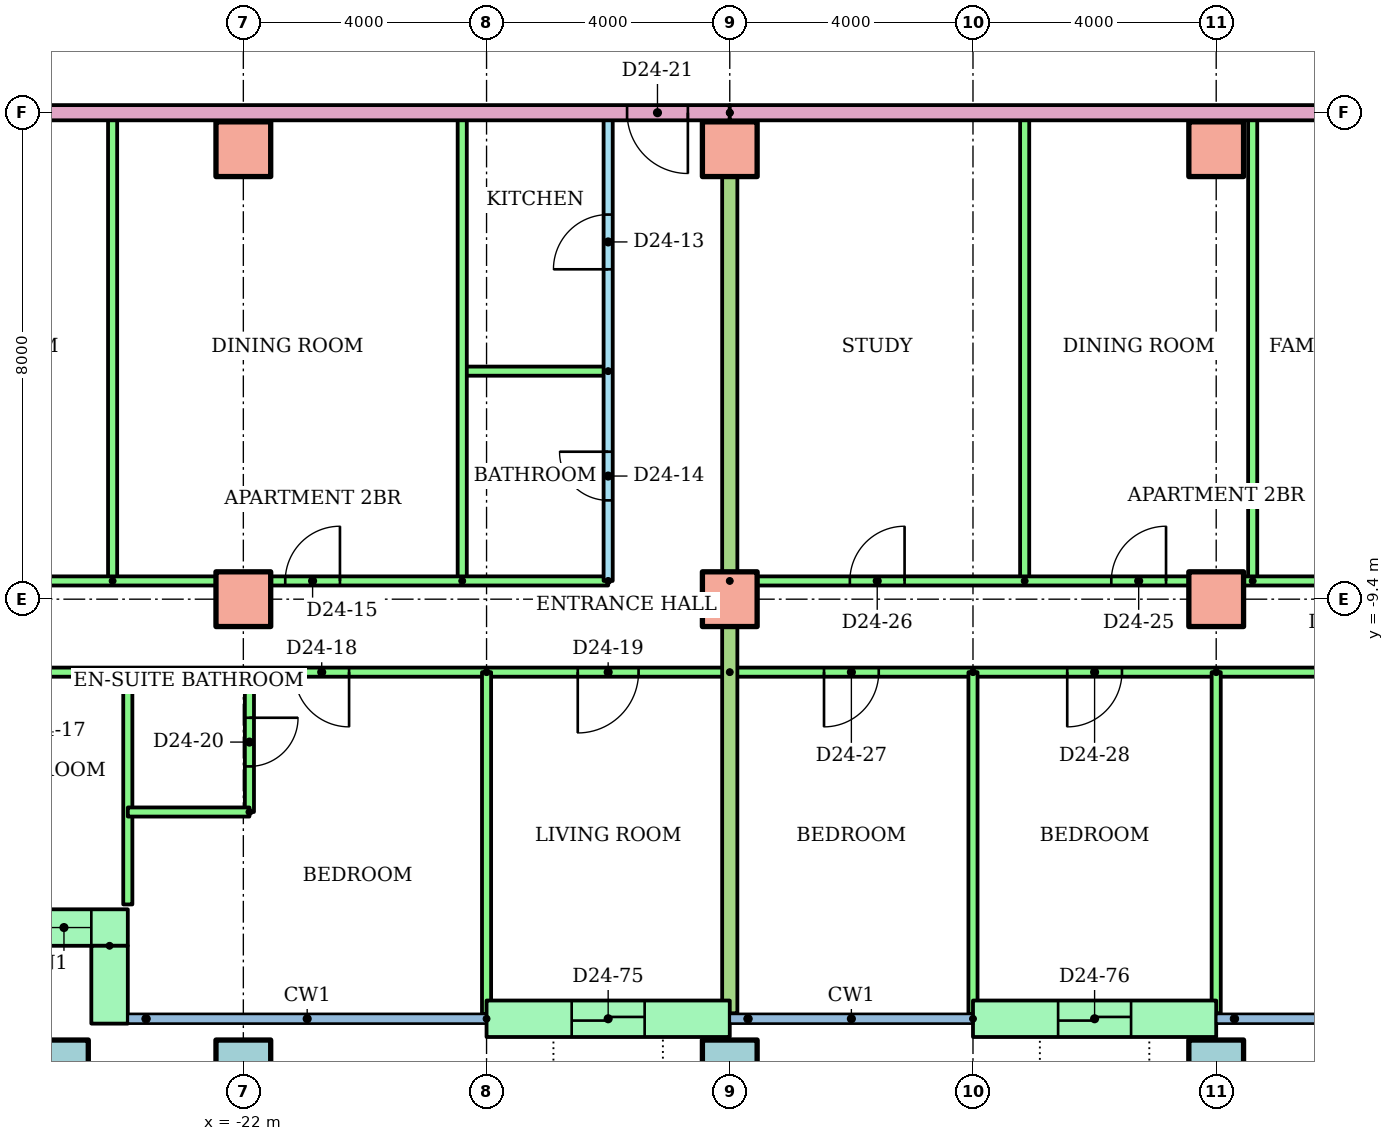
"""IFC4 building model, lengths in metres.
Left out: names, types, materials, properties, quantities, classifications, styles, units other than length and angle.
Written with IfcOpenShell. Run it as: python <this file> out.ifc"""

import sys

from ifc_helpers import new_model, si_unit, direction, frame, frame_2d, origin, origin_2d, place, context, subcontext, project, spatial, rectangle, hollow_rectangle, extrude, element, fill, save


model = new_model("IFC4")
c1 = context("Model", 3, precision=1e-05, world=origin(), true_north=direction((0.0, 1.0)))
c2 = subcontext(c1, "Body", "Model", "MODEL_VIEW")
j1 = project(units=[si_unit("LENGTHUNIT", "METRE"), si_unit("PLANEANGLEUNIT", "RADIAN")], contexts=[c1])
p1 = place(None, origin())
s1 = spatial("IfcSite", under=j1, at=p1, CompositionType="ELEMENT")
p2 = place(p1, origin())
s2 = spatial("IfcBuilding", under=s1, at=p2, CompositionType="ELEMENT")
p3 = place(p2, frame((0.0, 0.0, 93.5)))
s3 = spatial("IfcBuildingStorey", under=s2, at=p3, CompositionType="ELEMENT", Elevation=93.5)
for number, where in (
    (1, (-25.0, -17.1, 0.0)),
    (2, (-22.0, -17.1, 0.0)),
    (3, (-14.0, -17.1, 0.0)),
    (4, (-6.0, -17.1, 0.0)),
):
    element("IfcColumn", number, at=place(p3, frame(where)), inside=s3, PredefinedType="COLUMN", context=c2, shape_type="SweptSolid", body=[
        extrude(hollow_rectangle(XDim=0.9, YDim=0.9, WallThickness=0.045, at=origin_2d()), origin(), (0.0, 0.0, 1.0), 3.2),
    ])
for number, where in (
    (5, (-22.0, -9.4, 0.0)),
    (6, (-14.0, -9.4, 0.0)),
    (7, (-6.0, -9.4, 0.0)),
    (8, (-22.0, -2.0, 0.0)),
    (9, (-14.0, -2.0, 0.0)),
    (10, (-6.0, -2.0, 0.0)),
):
    element("IfcColumn", number, at=place(p3, frame(where)), inside=s3, PredefinedType="COLUMN", context=c2, shape_type="SweptSolid", body=[
        extrude(rectangle(XDim=0.9, YDim=0.9, at=origin_2d()), origin(), (0.0, 0.0, 1.0), 3.2),
    ])
p4 = place(p3, frame((-26.0, -14.8, 0.0)))
e11 = element("IfcWall", 11, at=p4, inside=s3, PredefinedType="STANDARD", context=c2, shape_type="SweptSolid", body=[
    extrude(rectangle(XDim=2.1, YDim=0.6, at=frame_2d((1.05, 0.0))), origin(), (0.0, 0.0, 1.0), 2.92),
])
p5 = place(p4, frame((0.6, 0.0, 0.9)))
e12 = element("IfcOpeningElement", 12, at=p5, cuts=e11, PredefinedType="OPENING", context=c2, shape_type="SweptSolid", body=[
    extrude(rectangle(XDim=0.9, YDim=1.5, at=frame_2d((0.45, 0.75))), frame((0.0, 0.31, 0.0), z_axis=(0.0, -1.0, 0.0), x_axis=(1.0, 0.0, 0.0)), (0.0, 0.0, 1.0), 0.62),
])
p6 = place(p3, frame((-24.2, -15.1, 0.0), z_axis=(0.0, 0.0, 1.0), x_axis=(0.0, -1.0, 0.0)))
e13 = element("IfcWall", 13, at=p6, inside=s3, PredefinedType="STANDARD", context=c2, shape_type="SweptSolid", body=[
    extrude(rectangle(XDim=1.28, YDim=0.6, at=frame_2d((0.64, 0.0))), origin(), (0.0, 0.0, 1.0), 2.92),
])
p7 = place(p3, frame((-18.0, -16.3, 0.0)))
e14 = element("IfcWall", 14, at=p7, inside=s3, PredefinedType="STANDARD", context=c2, shape_type="SweptSolid", body=[
    extrude(rectangle(XDim=4.0, YDim=0.6, at=frame_2d((2.0, 0.0))), origin(), (0.0, 0.0, 1.0), 2.92),
])
p8 = place(p7, frame((1.4, 0.0, 0.0)))
e15 = element("IfcOpeningElement", 15, at=p8, cuts=e14, PredefinedType="OPENING", context=c2, shape_type="SweptSolid", body=[
    extrude(rectangle(XDim=1.2, YDim=2.1, at=frame_2d((0.6, 1.05))), frame((0.0, 0.31, 0.0), z_axis=(0.0, -1.0, 0.0), x_axis=(1.0, 0.0, 0.0)), (0.0, 0.0, 1.0), 0.62),
])
p9 = place(p3, frame((-10.0, -16.3, 0.0)))
e16 = element("IfcWall", 16, at=p9, inside=s3, PredefinedType="STANDARD", context=c2, shape_type="SweptSolid", body=[
    extrude(rectangle(XDim=4.0, YDim=0.6, at=frame_2d((2.0, 0.0))), origin(), (0.0, 0.0, 1.0), 2.92),
])
p10 = place(p9, frame((1.4, 0.0, 0.0)))
e17 = element("IfcOpeningElement", 17, at=p10, cuts=e16, PredefinedType="OPENING", context=c2, shape_type="SweptSolid", body=[
    extrude(rectangle(XDim=1.2, YDim=2.1, at=frame_2d((0.6, 1.05))), frame((0.0, 0.31, 0.0), z_axis=(0.0, -1.0, 0.0), x_axis=(1.0, 0.0, 0.0)), (0.0, 0.0, 1.0), 0.62),
])
p11 = place(p3, frame((-16.0, -9.1, 0.0), z_axis=(0.0, 0.0, 1.0), x_axis=(0.0, 1.0, 0.0)))
e18 = element("IfcWall", 18, at=p11, inside=s3, PredefinedType="PARTITIONING", context=c2, shape_type="SweptSolid", body=[
    extrude(rectangle(XDim=7.7, YDim=0.15, at=frame_2d((3.85, 0.0))), origin(), (0.0, 0.0, 1.0), 2.4),
])
p12 = place(p11, frame((5.125, 0.0, 0.0)))
e19 = element("IfcOpeningElement", 19, at=p12, cuts=e18, PredefinedType="OPENING", context=c2, shape_type="SweptSolid", body=[
    extrude(rectangle(XDim=0.9, YDim=2.1, at=frame_2d((0.45, 1.05))), frame((0.0, 0.085, 0.0), z_axis=(0.0, -1.0, 0.0), x_axis=(1.0, 0.0, 0.0)), (0.0, 0.0, 1.0), 0.17),
])
p13 = place(p11, frame((1.325, 0.0, 0.0)))
e20 = element("IfcOpeningElement", 20, at=p13, cuts=e18, PredefinedType="OPENING", context=c2, shape_type="SweptSolid", body=[
    extrude(rectangle(XDim=0.8, YDim=2.1, at=frame_2d((0.4, 1.05))), frame((0.0, 0.085, 0.0), z_axis=(0.0, -1.0, 0.0), x_axis=(1.0, 0.0, 0.0)), (0.0, 0.0, 1.0), 0.17),
])
p14 = place(p3, frame((-16.0, -5.65, 0.0), z_axis=(0.0, 0.0, 1.0), x_axis=(-1.0, 0.0, 0.0)))
e21 = element("IfcWall", 21, at=p14, inside=s3, PredefinedType="PARTITIONING", context=c2, shape_type="SweptSolid", body=[
    extrude(rectangle(XDim=2.4, YDim=0.15, at=frame_2d((1.2, 0.0))), origin(), (0.0, 0.0, 1.0), 2.4),
])
for number, where, z_axis, x_axis in (
    (22, (-18.4, -9.1, 0.0), (0.0, 0.0, 1.0), (0.0, 1.0, 0.0)),
    (23, (-24.15, -9.1, 0.0), (0.0, 0.0, 1.0), (0.0, 1.0, 0.0)),
):
    element("IfcWall", number, at=place(p3, frame(where, z_axis=z_axis, x_axis=x_axis)), inside=s3, PredefinedType="PARTITIONING", context=c2, shape_type="SweptSolid", body=[
        extrude(rectangle(XDim=7.7, YDim=0.15, at=frame_2d((3.85, 0.0))), origin(), (0.0, 0.0, 1.0), 2.4),
    ])
p15 = place(p3, frame((-28.61, -9.1, 0.0)))
e24 = element("IfcWall", 24, at=p15, inside=s3, PredefinedType="PARTITIONING", context=c2, shape_type="SweptSolid", body=[
    extrude(rectangle(XDim=12.61, YDim=0.15, at=frame_2d((6.305, 0.0))), origin(), (0.0, 0.0, 1.0), 2.4),
])
p16 = place(p15, frame((7.299, 0.0, 0.0)))
e25 = element("IfcOpeningElement", 25, at=p16, cuts=e24, PredefinedType="OPENING", context=c2, shape_type="SweptSolid", body=[
    extrude(rectangle(XDim=0.9, YDim=2.1, at=frame_2d((0.45, 1.05))), frame((0.0, 0.085, 0.0), z_axis=(0.0, -1.0, 0.0), x_axis=(1.0, 0.0, 0.0)), (0.0, 0.0, 1.0), 0.17),
])
p17 = place(p15, frame((1.885, 0.0, 0.0)))
e26 = element("IfcOpeningElement", 26, at=p17, cuts=e24, PredefinedType="OPENING", context=c2, shape_type="SweptSolid", body=[
    extrude(rectangle(XDim=0.9, YDim=2.1, at=frame_2d((0.45, 1.05))), frame((0.0, 0.085, 0.0), z_axis=(0.0, -1.0, 0.0), x_axis=(1.0, 0.0, 0.0)), (0.0, 0.0, 1.0), 0.17),
])
p18 = place(p3, frame((-14.0, -10.6, 0.0), z_axis=(0.0, 0.0, 1.0), x_axis=(-1.0, 0.0, 0.0)))
e27 = element("IfcWall", 27, at=p18, inside=s3, PredefinedType="PARTITIONING", context=c2, shape_type="SweptSolid", body=[
    extrude(rectangle(XDim=14.62, YDim=0.15, at=frame_2d((7.31, 0.0))), origin(), (0.0, 0.0, 1.0), 2.4),
])
p19 = place(p18, frame((11.7, 0.0, 0.0)))
e28 = element("IfcOpeningElement", 28, at=p19, cuts=e27, PredefinedType="OPENING", context=c2, shape_type="SweptSolid", body=[
    extrude(rectangle(XDim=0.9, YDim=2.1, at=frame_2d((0.45, 1.05))), frame((0.0, 0.085, 0.0), z_axis=(0.0, -1.0, 0.0), x_axis=(1.0, 0.0, 0.0)), (0.0, 0.0, 1.0), 0.17),
])
p20 = place(p18, frame((6.261, 0.0, 0.0)))
e29 = element("IfcOpeningElement", 29, at=p20, cuts=e27, PredefinedType="OPENING", context=c2, shape_type="SweptSolid", body=[
    extrude(rectangle(XDim=0.9, YDim=2.1, at=frame_2d((0.45, 1.05))), frame((0.0, 0.085, 0.0), z_axis=(0.0, -1.0, 0.0), x_axis=(1.0, 0.0, 0.0)), (0.0, 0.0, 1.0), 0.17),
])
p21 = place(p18, frame((1.5, 0.0, 0.0)))
e30 = element("IfcOpeningElement", 30, at=p21, cuts=e27, PredefinedType="OPENING", context=c2, shape_type="SweptSolid", body=[
    extrude(rectangle(XDim=1.0, YDim=2.1, at=frame_2d((0.5, 1.05))), frame((0.0, 0.085, 0.0), z_axis=(0.0, -1.0, 0.0), x_axis=(1.0, 0.0, 0.0)), (0.0, 0.0, 1.0), 0.17),
])
p22 = place(p3, frame((-23.9, -10.6, 0.0), z_axis=(0.0, 0.0, 1.0), x_axis=(0.0, -1.0, 0.0)))
e31 = element("IfcWall", 31, at=p22, inside=s3, PredefinedType="PARTITIONING", context=c2, shape_type="SweptSolid", body=[
    extrude(rectangle(XDim=3.82, YDim=0.15, at=frame_2d((1.91, 0.0))), origin(), (0.0, 0.0, 1.0), 2.4),
])
p23 = place(p3, frame((-18.0, -10.6, 0.0), z_axis=(0.0, 0.0, 1.0), x_axis=(0.0, -1.0, 0.0)))
e32 = element("IfcWall", 32, at=p23, inside=s3, PredefinedType="PARTITIONING", context=c2, shape_type="SweptSolid", body=[
    extrude(rectangle(XDim=5.621, YDim=0.15, at=frame_2d((2.811, 0.0))), origin(), (0.0, 0.0, 1.0), 2.4),
])
p24 = place(p3, frame((-21.9, -10.6, 0.0), z_axis=(0.0, 0.0, 1.0), x_axis=(0.0, -1.0, 0.0)))
e33 = element("IfcWall", 33, at=p24, inside=s3, PredefinedType="PARTITIONING", context=c2, shape_type="SweptSolid", body=[
    extrude(rectangle(XDim=2.3, YDim=0.15, at=frame_2d((1.15, 0.0))), origin(), (0.0, 0.0, 1.0), 2.4),
])
p25 = place(p24, frame((0.75, 0.0, 0.0)))
e34 = element("IfcOpeningElement", 34, at=p25, cuts=e33, PredefinedType="OPENING", context=c2, shape_type="SweptSolid", body=[
    extrude(rectangle(XDim=0.8, YDim=2.1, at=frame_2d((0.4, 1.05))), frame((0.0, 0.085, 0.0), z_axis=(0.0, -1.0, 0.0), x_axis=(1.0, 0.0, 0.0)), (0.0, 0.0, 1.0), 0.17),
])
p26 = place(p3, frame((-21.9, -12.9, 0.0), z_axis=(0.0, 0.0, 1.0), x_axis=(-1.0, 0.0, 0.0)))
e35 = element("IfcWall", 35, at=p26, inside=s3, PredefinedType="PARTITIONING", context=c2, shape_type="SweptSolid", body=[
    extrude(rectangle(XDim=2.0, YDim=0.15, at=frame_2d((1.0, 0.0))), origin(), (0.0, 0.0, 1.0), 2.4),
])
for number, where, z_axis, x_axis in (
    (36, (-5.4, -9.1, 0.0), (0.0, 0.0, 1.0), (0.0, 1.0, 0.0)),
    (37, (-9.15, -9.1, 0.0), (0.0, 0.0, 1.0), (0.0, 1.0, 0.0)),
):
    element("IfcWall", number, at=place(p3, frame(where, z_axis=z_axis, x_axis=x_axis)), inside=s3, PredefinedType="PARTITIONING", context=c2, shape_type="SweptSolid", body=[
        extrude(rectangle(XDim=7.7, YDim=0.15, at=frame_2d((3.85, 0.0))), origin(), (0.0, 0.0, 1.0), 2.4),
    ])
p27 = place(p3, frame((-14.0, -9.1, 0.0)))
e38 = element("IfcWall", 38, at=p27, inside=s3, PredefinedType="PARTITIONING", context=c2, shape_type="SweptSolid", body=[
    extrude(rectangle(XDim=14.0, YDim=0.15, at=frame_2d((7.0, 0.0))), origin(), (0.0, 0.0, 1.0), 2.4),
])
p28 = place(p27, frame((9.65, 0.0, 0.0)))
e39 = element("IfcOpeningElement", 39, at=p28, cuts=e38, PredefinedType="OPENING", context=c2, shape_type="SweptSolid", body=[
    extrude(rectangle(XDim=0.9, YDim=2.1, at=frame_2d((0.45, 1.05))), frame((0.0, 0.085, 0.0), z_axis=(0.0, -1.0, 0.0), x_axis=(1.0, 0.0, 0.0)), (0.0, 0.0, 1.0), 0.17),
])
p29 = place(p27, frame((6.275, 0.0, 0.0)))
e40 = element("IfcOpeningElement", 40, at=p29, cuts=e38, PredefinedType="OPENING", context=c2, shape_type="SweptSolid", body=[
    extrude(rectangle(XDim=0.9, YDim=2.1, at=frame_2d((0.45, 1.05))), frame((0.0, 0.085, 0.0), z_axis=(0.0, -1.0, 0.0), x_axis=(1.0, 0.0, 0.0)), (0.0, 0.0, 1.0), 0.17),
])
p30 = place(p27, frame((1.975, 0.0, 0.0)))
e41 = element("IfcOpeningElement", 41, at=p30, cuts=e38, PredefinedType="OPENING", context=c2, shape_type="SweptSolid", body=[
    extrude(rectangle(XDim=0.9, YDim=2.1, at=frame_2d((0.45, 1.05))), frame((0.0, 0.085, 0.0), z_axis=(0.0, -1.0, 0.0), x_axis=(1.0, 0.0, 0.0)), (0.0, 0.0, 1.0), 0.17),
])
p31 = place(p3, frame((2.0, -10.6, 0.0), z_axis=(0.0, 0.0, 1.0), x_axis=(-1.0, 0.0, 0.0)))
e42 = element("IfcWall", 42, at=p31, inside=s3, PredefinedType="PARTITIONING", context=c2, shape_type="SweptSolid", body=[
    extrude(rectangle(XDim=16.0, YDim=0.15, at=frame_2d((8.0, 0.0))), origin(), (0.0, 0.0, 1.0), 2.4),
])
p32 = place(p31, frame((13.55, 0.0, 0.0)))
e43 = element("IfcOpeningElement", 43, at=p32, cuts=e42, PredefinedType="OPENING", context=c2, shape_type="SweptSolid", body=[
    extrude(rectangle(XDim=0.9, YDim=2.1, at=frame_2d((0.45, 1.05))), frame((0.0, 0.085, 0.0), z_axis=(0.0, -1.0, 0.0), x_axis=(1.0, 0.0, 0.0)), (0.0, 0.0, 1.0), 0.17),
])
p33 = place(p31, frame((9.55, 0.0, 0.0)))
e44 = element("IfcOpeningElement", 44, at=p33, cuts=e42, PredefinedType="OPENING", context=c2, shape_type="SweptSolid", body=[
    extrude(rectangle(XDim=0.9, YDim=2.1, at=frame_2d((0.45, 1.05))), frame((0.0, 0.085, 0.0), z_axis=(0.0, -1.0, 0.0), x_axis=(1.0, 0.0, 0.0)), (0.0, 0.0, 1.0), 0.17),
])
p34 = place(p31, frame((3.5, 0.0, 0.0)))
e45 = element("IfcOpeningElement", 45, at=p34, cuts=e42, PredefinedType="OPENING", context=c2, shape_type="SweptSolid", body=[
    extrude(rectangle(XDim=1.0, YDim=2.1, at=frame_2d((0.5, 1.05))), frame((0.0, 0.085, 0.0), z_axis=(0.0, -1.0, 0.0), x_axis=(1.0, 0.0, 0.0)), (0.0, 0.0, 1.0), 0.17),
])
p35 = place(p3, frame((-10.0, -10.6, 0.0), z_axis=(0.0, 0.0, 1.0), x_axis=(0.0, -1.0, 0.0)))
e46 = element("IfcWall", 46, at=p35, inside=s3, PredefinedType="PARTITIONING", context=c2, shape_type="SweptSolid", body=[
    extrude(rectangle(XDim=5.621, YDim=0.15, at=frame_2d((2.811, 0.0))), origin(), (0.0, 0.0, 1.0), 2.4),
])
p36 = place(p3, frame((-6.0, -10.6, 0.0), z_axis=(0.0, 0.0, 1.0), x_axis=(0.0, -1.0, 0.0)))
e47 = element("IfcWall", 47, at=p36, inside=s3, PredefinedType="PARTITIONING", context=c2, shape_type="SweptSolid", body=[
    extrude(rectangle(XDim=5.61, YDim=0.15, at=frame_2d((2.805, 0.0))), origin(), (0.0, 0.0, 1.0), 2.4),
])
p37 = place(p3, frame((-14.0, -1.4, 0.0), z_axis=(0.0, 0.0, 1.0), x_axis=(0.0, -1.0, 0.0)))
e48 = element("IfcWall", 48, at=p37, inside=s3, PredefinedType="PARTITIONING", context=c2, shape_type="SweptSolid", body=[
    extrude(rectangle(XDim=14.81, YDim=0.25, at=frame_2d((7.405, 0.0))), origin(), (0.0, 0.0, 1.0), 2.4),
])
p38 = place(p3, frame((-14.0, -1.4, 0.0), z_axis=(0.0, 0.0, 1.0), x_axis=(-1.0, 0.0, 0.0)))
e49 = element("IfcWall", 49, at=p38, inside=s3, PredefinedType="PARTITIONING", context=c2, shape_type="SweptSolid", body=[
    extrude(rectangle(XDim=14.62, YDim=0.25, at=frame_2d((7.31, 0.0))), origin(), (0.0, 0.0, 1.0), 2.4),
])
p39 = place(p38, frame((0.689, 0.0, 0.0)))
e50 = element("IfcOpeningElement", 50, at=p39, cuts=e49, PredefinedType="OPENING", context=c2, shape_type="SweptSolid", body=[
    extrude(rectangle(XDim=1.0, YDim=2.1, at=frame_2d((0.5, 1.05))), frame((0.0, 0.135, 0.0), z_axis=(0.0, -1.0, 0.0), x_axis=(1.0, 0.0, 0.0)), (0.0, 0.0, 1.0), 0.27),
])
p40 = place(p3, frame((14.0, -1.4, 0.0), z_axis=(0.0, 0.0, 1.0), x_axis=(-1.0, 0.0, 0.0)))
e51 = element("IfcWall", 51, at=p40, inside=s3, PredefinedType="PARTITIONING", context=c2, shape_type="SweptSolid", body=[
    extrude(rectangle(XDim=28.0, YDim=0.25, at=frame_2d((14.0, 0.0))), origin(), (0.0, 0.0, 1.0), 2.4),
])
p41 = place(p40, frame((12.689, 0.0, 0.0)))
e52 = element("IfcOpeningElement", 52, at=p41, cuts=e51, PredefinedType="OPENING", context=c2, shape_type="SweptSolid", body=[
    extrude(rectangle(XDim=1.0, YDim=2.1, at=frame_2d((0.5, 1.05))), frame((0.0, 0.135, 0.0), z_axis=(0.0, -1.0, 0.0), x_axis=(1.0, 0.0, 0.0)), (0.0, 0.0, 1.0), 0.27),
])
p42 = place(p40, frame((10.311, 0.0, 0.0)))
e53 = element("IfcOpeningElement", 53, at=p42, cuts=e51, PredefinedType="OPENING", context=c2, shape_type="SweptSolid", body=[
    extrude(rectangle(XDim=1.0, YDim=2.1, at=frame_2d((0.5, 1.05))), frame((0.0, 0.135, 0.0), z_axis=(0.0, -1.0, 0.0), x_axis=(1.0, 0.0, 0.0)), (0.0, 0.0, 1.0), 0.27),
])
p43 = place(p5, origin())
e54 = element("IfcWindow", 54, at=p43, inside=s3, PartitioningType="SINGLE_PANEL", PredefinedType="WINDOW", context=c2, shape_type="SweptSolid", body=[
    extrude(rectangle(XDim=0.9, YDim=1.5, at=frame_2d((0.45, 0.75))), frame((0.0, 0.03, 0.0), z_axis=(0.0, -1.0, 0.0), x_axis=(1.0, 0.0, 0.0)), (0.0, 0.0, 1.0), 0.06),
])
fill(e12, e54)
p44 = place(p12, origin())
e55 = element("IfcDoor", 55, at=p44, inside=s3, OperationType="SINGLE_SWING_LEFT", PredefinedType="DOOR", context=c2, shape_type="SweptSolid", body=[
    extrude(rectangle(XDim=0.9, YDim=2.1, at=frame_2d((0.45, 1.05))), frame((0.0, 0.025, 0.0), z_axis=(0.0, -1.0, 0.0), x_axis=(1.0, 0.0, 0.0)), (0.0, 0.0, 1.0), 0.05),
])
fill(e19, e55)
p45 = place(p13, origin())
e56 = element("IfcDoor", 56, at=p45, inside=s3, OperationType="SINGLE_SWING_RIGHT", PredefinedType="DOOR", context=c2, shape_type="SweptSolid", body=[
    extrude(rectangle(XDim=0.8, YDim=2.1, at=frame_2d((0.4, 1.05))), frame((0.0, 0.025, 0.0), z_axis=(0.0, -1.0, 0.0), x_axis=(1.0, 0.0, 0.0)), (0.0, 0.0, 1.0), 0.05),
])
fill(e20, e56)
p46 = place(p16, origin())
e57 = element("IfcDoor", 57, at=p46, inside=s3, OperationType="SINGLE_SWING_RIGHT", PredefinedType="DOOR", context=c2, shape_type="SweptSolid", body=[
    extrude(rectangle(XDim=0.9, YDim=2.1, at=frame_2d((0.45, 1.05))), frame((0.0, 0.025, 0.0), z_axis=(0.0, -1.0, 0.0), x_axis=(1.0, 0.0, 0.0)), (0.0, 0.0, 1.0), 0.05),
])
fill(e25, e57)
p47 = place(p20, origin())
e58 = element("IfcDoor", 58, at=p47, inside=s3, OperationType="SINGLE_SWING_LEFT", PredefinedType="DOOR", context=c2, shape_type="SweptSolid", body=[
    extrude(rectangle(XDim=0.9, YDim=2.1, at=frame_2d((0.45, 1.05))), frame((0.0, 0.025, 0.0), z_axis=(0.0, -1.0, 0.0), x_axis=(1.0, 0.0, 0.0)), (0.0, 0.0, 1.0), 0.05),
])
fill(e29, e58)
p48 = place(p21, origin())
e59 = element("IfcDoor", 59, at=p48, inside=s3, OperationType="SINGLE_SWING_RIGHT", PredefinedType="DOOR", context=c2, shape_type="SweptSolid", body=[
    extrude(rectangle(XDim=1.0, YDim=2.1, at=frame_2d((0.5, 1.05))), frame((0.0, 0.025, 0.0), z_axis=(0.0, -1.0, 0.0), x_axis=(1.0, 0.0, 0.0)), (0.0, 0.0, 1.0), 0.05),
])
fill(e30, e59)
p49 = place(p25, origin())
e60 = element("IfcDoor", 60, at=p49, inside=s3, OperationType="SINGLE_SWING_LEFT", PredefinedType="DOOR", context=c2, shape_type="SweptSolid", body=[
    extrude(rectangle(XDim=0.8, YDim=2.1, at=frame_2d((0.4, 1.05))), frame((0.0, 0.025, 0.0), z_axis=(0.0, -1.0, 0.0), x_axis=(1.0, 0.0, 0.0)), (0.0, 0.0, 1.0), 0.05),
])
fill(e34, e60)
p50 = place(p39, origin())
e61 = element("IfcDoor", 61, at=p50, inside=s3, OperationType="SINGLE_SWING_LEFT", PredefinedType="DOOR", context=c2, shape_type="SweptSolid", body=[
    extrude(rectangle(XDim=1.0, YDim=2.1, at=frame_2d((0.5, 1.05))), frame((0.0, 0.025, 0.0), z_axis=(0.0, -1.0, 0.0), x_axis=(1.0, 0.0, 0.0)), (0.0, 0.0, 1.0), 0.05),
])
fill(e50, e61)
p51 = place(p29, origin())
e62 = element("IfcDoor", 62, at=p51, inside=s3, OperationType="SINGLE_SWING_RIGHT", PredefinedType="DOOR", context=c2, shape_type="SweptSolid", body=[
    extrude(rectangle(XDim=0.9, YDim=2.1, at=frame_2d((0.45, 1.05))), frame((0.0, 0.025, 0.0), z_axis=(0.0, -1.0, 0.0), x_axis=(1.0, 0.0, 0.0)), (0.0, 0.0, 1.0), 0.05),
])
fill(e40, e62)
p52 = place(p30, origin())
e63 = element("IfcDoor", 63, at=p52, inside=s3, OperationType="SINGLE_SWING_RIGHT", PredefinedType="DOOR", context=c2, shape_type="SweptSolid", body=[
    extrude(rectangle(XDim=0.9, YDim=2.1, at=frame_2d((0.45, 1.05))), frame((0.0, 0.025, 0.0), z_axis=(0.0, -1.0, 0.0), x_axis=(1.0, 0.0, 0.0)), (0.0, 0.0, 1.0), 0.05),
])
fill(e41, e63)
p53 = place(p32, origin())
e64 = element("IfcDoor", 64, at=p53, inside=s3, OperationType="SINGLE_SWING_RIGHT", PredefinedType="DOOR", context=c2, shape_type="SweptSolid", body=[
    extrude(rectangle(XDim=0.9, YDim=2.1, at=frame_2d((0.45, 1.05))), frame((0.0, 0.025, 0.0), z_axis=(0.0, -1.0, 0.0), x_axis=(1.0, 0.0, 0.0)), (0.0, 0.0, 1.0), 0.05),
])
fill(e43, e64)
p54 = place(p33, origin())
e65 = element("IfcDoor", 65, at=p54, inside=s3, OperationType="SINGLE_SWING_RIGHT", PredefinedType="DOOR", context=c2, shape_type="SweptSolid", body=[
    extrude(rectangle(XDim=0.9, YDim=2.1, at=frame_2d((0.45, 1.05))), frame((0.0, 0.025, 0.0), z_axis=(0.0, -1.0, 0.0), x_axis=(1.0, 0.0, 0.0)), (0.0, 0.0, 1.0), 0.05),
])
fill(e44, e65)
p55 = place(p8, origin())
e66 = element("IfcDoor", 66, at=p55, inside=s3, OperationType="SLIDING_TO_LEFT", PredefinedType="DOOR", context=c2, shape_type="SweptSolid", body=[
    extrude(rectangle(XDim=1.2, YDim=2.1, at=frame_2d((0.6, 1.05))), frame((0.0, 0.025, 0.0), z_axis=(0.0, -1.0, 0.0), x_axis=(1.0, 0.0, 0.0)), (0.0, 0.0, 1.0), 0.05),
])
fill(e15, e66)
p56 = place(p10, origin())
e67 = element("IfcDoor", 67, at=p56, inside=s3, OperationType="SLIDING_TO_LEFT", PredefinedType="DOOR", context=c2, shape_type="SweptSolid", body=[
    extrude(rectangle(XDim=1.2, YDim=2.1, at=frame_2d((0.6, 1.05))), frame((0.0, 0.025, 0.0), z_axis=(0.0, -1.0, 0.0), x_axis=(1.0, 0.0, 0.0)), (0.0, 0.0, 1.0), 0.05),
])
fill(e17, e67)
save(model, sys.argv[1])
